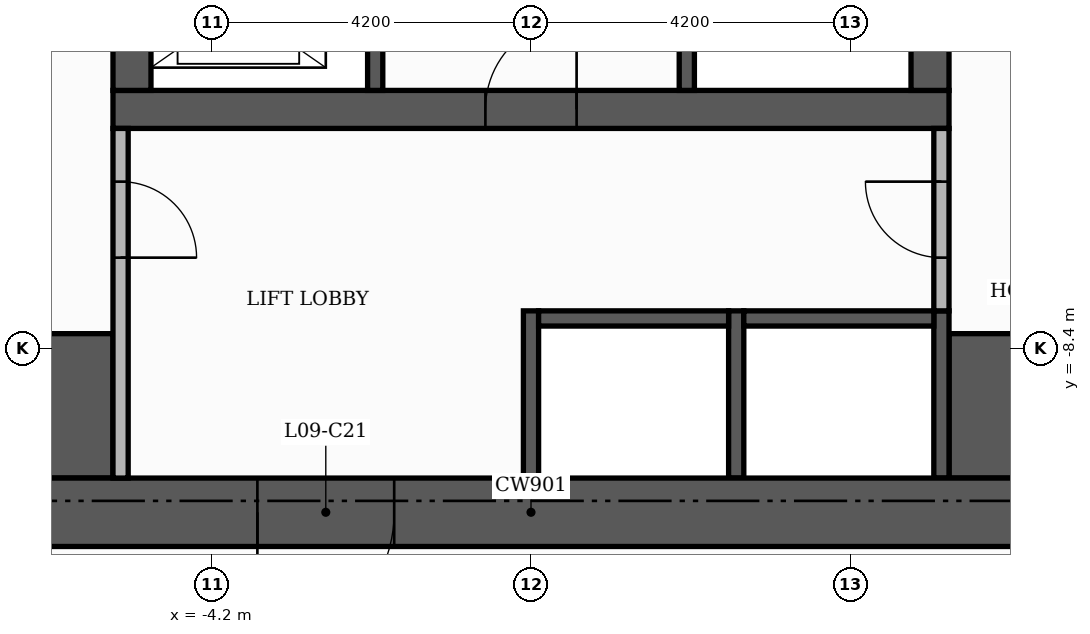
"""IFC4 building model, lengths in metres.
Left out: names, types, materials, properties, quantities, classifications, styles, units other than length and angle.
Written with IfcOpenShell. Run it as: python <this file> out.ifc"""

import sys

from ifc_helpers import new_model, si_unit, direction, frame, frame_2d, origin, place, context, subcontext, project, spatial, rectangle, extrude, element, fill, save


model = new_model("IFC4")
c1 = context("Model", 3, precision=1e-05, world=origin(), true_north=direction((0.0, 1.0)))
c2 = subcontext(c1, "Body", "Model", "MODEL_VIEW")
j1 = project(units=[si_unit("LENGTHUNIT", "METRE"), si_unit("PLANEANGLEUNIT", "RADIAN")], contexts=[c1])
p1 = place(None, origin())
s1 = spatial("IfcSite", under=j1, at=p1, CompositionType="ELEMENT")
p2 = place(p1, origin())
s2 = spatial("IfcBuilding", under=s1, at=p2, CompositionType="ELEMENT")
p3 = place(p2, frame((0.0, 0.0, 42.6)))
s3 = spatial("IfcBuildingStorey", under=s2, at=p3, CompositionType="ELEMENT", Elevation=42.6)
p4 = place(p3, frame((-5.5, -5.25, 0.0), z_axis=(0.0, 0.0, 1.0), x_axis=(1.0, 0.0, 0.0)))
e1 = element("IfcWall", 1, at=p4, inside=s3, PredefinedType="SHEAR", context=c2, shape_type="SweptSolid", body=[
    extrude(rectangle(XDim=11.0, YDim=0.5, at=frame_2d((5.5, 0.0))), origin(), (0.0, 0.0, 1.0), 3.48),
])
p5 = place(p4, frame((4.9, 0.0, 0.0)))
e2 = element("IfcOpeningElement", 2, at=p5, cuts=e1, PredefinedType="OPENING", context=c2, shape_type="SweptSolid", body=[
    extrude(rectangle(XDim=1.2, YDim=2.1, at=frame_2d((0.6, 1.05))), frame((0.0, 0.26, 0.0), z_axis=(0.0, -1.0, 0.0), x_axis=(1.0, 0.0, 0.0)), (0.0, 0.0, 1.0), 0.52),
])
for number, where, z_axis, x_axis in (
    (3, (-5.25, -5.0, 0.0), (0.0, 0.0, 1.0), (0.0, 1.0, 0.0)),
    (4, (5.25, -5.0, 0.0), (0.0, 0.0, 1.0), (0.0, 1.0, 0.0)),
):
    element("IfcWall", number, at=place(p3, frame(where, z_axis=z_axis, x_axis=x_axis)), inside=s3, PredefinedType="SHEAR", context=c2, shape_type="SweptSolid", body=[
        extrude(rectangle(XDim=10.5, YDim=0.5, at=frame_2d((5.25, 0.0))), origin(), (0.0, 0.0, 1.0), 3.48),
    ])
for number, where, z_axis, x_axis in (
    (5, (-10.1, -9.15, 0.0), (0.0, 0.0, 1.0), (1.0, 0.0, 0.0)),
    (6, (5.5, -9.15, 0.0), (0.0, 0.0, 1.0), (1.0, 0.0, 0.0)),
):
    element("IfcWall", number, at=place(p3, frame(where, z_axis=z_axis, x_axis=x_axis)), inside=s3, PredefinedType="SHEAR", context=c2, shape_type="SweptSolid", body=[
        extrude(rectangle(XDim=4.6, YDim=1.9, at=frame_2d((2.3, 0.0))), origin(), (0.0, 0.0, 1.0), 3.48),
    ])
p6 = place(p3, frame((2.05, -5.0, 0.0), z_axis=(0.0, 0.0, 1.0), x_axis=(0.0, 1.0, 0.0)))
e7 = element("IfcWall", 7, at=p6, inside=s3, PredefinedType="SHEAR", context=c2, shape_type="SweptSolid", body=[
    extrude(rectangle(XDim=6.6, YDim=0.2, at=frame_2d((3.3, 0.0))), origin(), (0.0, 0.0, 1.0), 3.48),
])
p7 = place(p6, frame((5.25, 0.0, 0.0)))
e8 = element("IfcOpeningElement", 8, at=p7, cuts=e7, PredefinedType="OPENING", context=c2, shape_type="SweptSolid", body=[
    extrude(rectangle(XDim=1.0, YDim=2.1, at=frame_2d((0.5, 1.05))), frame((0.0, 0.11, 0.0), z_axis=(0.0, -1.0, 0.0), x_axis=(1.0, 0.0, 0.0)), (0.0, 0.0, 1.0), 0.22),
])
for number, where, z_axis, x_axis in (
    (9, (0.0, -10.1, 0.0), (0.0, 0.0, 1.0), (0.0, 1.0, 0.0)),
    (10, (2.7, -10.1, 0.0), (0.0, 0.0, 1.0), (0.0, 1.0, 0.0)),
    (11, (5.4, -10.1, 0.0), (0.0, 0.0, 1.0), (0.0, 1.0, 0.0)),
):
    element("IfcWall", number, at=place(p3, frame(where, z_axis=z_axis, x_axis=x_axis)), inside=s3, PredefinedType="SHEAR", context=c2, shape_type="SweptSolid", body=[
        extrude(rectangle(XDim=2.2, YDim=0.2, at=frame_2d((1.1, 0.0))), origin(), (0.0, 0.0, 1.0), 3.48),
    ])
for number, where, z_axis, x_axis in (
    (12, (0.1, -8.0, 0.0), (0.0, 0.0, 1.0), (1.0, 0.0, 0.0)),
    (13, (2.8, -8.0, 0.0), (0.0, 0.0, 1.0), (1.0, 0.0, 0.0)),
):
    element("IfcWall", number, at=place(p3, frame(where, z_axis=z_axis, x_axis=x_axis)), inside=s3, PredefinedType="SHEAR", context=c2, shape_type="SweptSolid", body=[
        extrude(rectangle(XDim=2.5, YDim=0.2, at=frame_2d((1.25, 0.0))), origin(), (0.0, 0.0, 1.0), 3.48),
    ])
p8 = place(p3, frame((-2.05, -5.0, 0.0), z_axis=(0.0, 0.0, 1.0), x_axis=(0.0, 1.0, 0.0)))
e14 = element("IfcWall", 14, at=p8, inside=s3, PredefinedType="SHEAR", context=c2, shape_type="SweptSolid", body=[
    extrude(rectangle(XDim=3.4, YDim=0.2, at=frame_2d((1.7, 0.0))), origin(), (0.0, 0.0, 1.0), 3.48),
])
p9 = place(p8, frame((0.55, 0.0, 0.0)))
e15 = element("IfcOpeningElement", 15, at=p9, cuts=e14, PredefinedType="OPENING", context=c2, shape_type="SweptSolid", body=[
    extrude(rectangle(XDim=1.1, YDim=2.1, at=frame_2d((0.55, 1.05))), frame((0.0, 0.11, 0.0), z_axis=(0.0, -1.0, 0.0), x_axis=(1.0, 0.0, 0.0)), (0.0, 0.0, 1.0), 0.22),
])
p10 = place(p8, frame((2.45, 0.0, 0.0)))
e16 = element("IfcOpeningElement", 16, at=p10, cuts=e14, PredefinedType="OPENING", context=c2, shape_type="SweptSolid", body=[
    extrude(rectangle(XDim=0.8, YDim=2.1, at=frame_2d((0.4, 1.05))), frame((0.0, 0.11, 0.0), z_axis=(0.0, -1.0, 0.0), x_axis=(1.0, 0.0, 0.0)), (0.0, 0.0, 1.0), 0.22),
])
p11 = place(p3, frame((-11.0, -10.55, 0.0), z_axis=(0.0, 0.0, 1.0), x_axis=(1.0, 0.0, 0.0)))
e17 = element("IfcWall", 17, at=p11, inside=s3, PredefinedType="SHEAR", context=c2, shape_type="SweptSolid", body=[
    extrude(rectangle(XDim=22.0, YDim=0.9, at=frame_2d((11.0, 0.0))), origin(), (0.0, 0.0, 1.0), 3.48),
])
p12 = place(p11, frame((7.4, 0.0, 0.0)))
e18 = element("IfcOpeningElement", 18, at=p12, cuts=e17, PredefinedType="OPENING", context=c2, shape_type="SweptSolid", body=[
    extrude(rectangle(XDim=1.8, YDim=2.2, at=frame_2d((0.9, 1.1))), frame((0.0, 0.46, 0.0), z_axis=(0.0, -1.0, 0.0), x_axis=(1.0, 0.0, 0.0)), (0.0, 0.0, 1.0), 0.92),
])
p13 = place(p3, frame((-5.4, -10.1, 0.0), z_axis=(0.0, 0.0, 1.0), x_axis=(0.0, 1.0, 0.0)))
e19 = element("IfcWall", 19, at=p13, inside=s3, PredefinedType="PARTITIONING", context=c2, shape_type="SweptSolid", body=[
    extrude(rectangle(XDim=4.6, YDim=0.2, at=frame_2d((2.3, 0.0))), origin(), (0.0, 0.0, 1.0), 3.48),
])
p14 = place(p13, frame((2.9, 0.0, 0.0)))
e20 = element("IfcOpeningElement", 20, at=p14, cuts=e19, PredefinedType="OPENING", context=c2, shape_type="SweptSolid", body=[
    extrude(rectangle(XDim=1.0, YDim=2.1, at=frame_2d((0.5, 1.05))), frame((0.0, 0.11, 0.0), z_axis=(0.0, -1.0, 0.0), x_axis=(1.0, 0.0, 0.0)), (0.0, 0.0, 1.0), 0.22),
])
p15 = place(p3, frame((5.4, -7.9, 0.0), z_axis=(0.0, 0.0, 1.0), x_axis=(0.0, 1.0, 0.0)))
e21 = element("IfcWall", 21, at=p15, inside=s3, PredefinedType="PARTITIONING", context=c2, shape_type="SweptSolid", body=[
    extrude(rectangle(XDim=2.4, YDim=0.2, at=frame_2d((1.2, 0.0))), origin(), (0.0, 0.0, 1.0), 3.48),
])
p16 = place(p15, frame((0.7, 0.0, 0.0)))
e22 = element("IfcOpeningElement", 22, at=p16, cuts=e21, PredefinedType="OPENING", context=c2, shape_type="SweptSolid", body=[
    extrude(rectangle(XDim=1.0, YDim=2.1, at=frame_2d((0.5, 1.05))), frame((0.0, 0.11, 0.0), z_axis=(0.0, -1.0, 0.0), x_axis=(1.0, 0.0, 0.0)), (0.0, 0.0, 1.0), 0.22),
])
p17 = place(p5, origin())
e23 = element("IfcDoor", 23, at=p17, inside=s3, OperationType="SINGLE_SWING_RIGHT", PredefinedType="DOOR", context=c2, shape_type="SweptSolid", body=[
    extrude(rectangle(XDim=1.2, YDim=2.1, at=frame_2d((0.6, 1.05))), frame((0.0, 0.025, 0.0), z_axis=(0.0, -1.0, 0.0), x_axis=(1.0, 0.0, 0.0)), (0.0, 0.0, 1.0), 0.05),
])
fill(e2, e23)
p18 = place(p14, frame((1.0, 0.0, 0.0), z_axis=(0.0, 0.0, 1.0), x_axis=(-1.0, 0.0, 0.0)))
e24 = element("IfcDoor", 24, at=p18, inside=s3, OperationType="SINGLE_SWING_LEFT", PredefinedType="DOOR", context=c2, shape_type="SweptSolid", body=[
    extrude(rectangle(XDim=1.0, YDim=2.1, at=frame_2d((0.5, 1.05))), frame((0.0, 0.025, 0.0), z_axis=(0.0, -1.0, 0.0), x_axis=(1.0, 0.0, 0.0)), (0.0, 0.0, 1.0), 0.05),
])
fill(e20, e24)
p19 = place(p16, origin())
e25 = element("IfcDoor", 25, at=p19, inside=s3, OperationType="SINGLE_SWING_RIGHT", PredefinedType="DOOR", context=c2, shape_type="SweptSolid", body=[
    extrude(rectangle(XDim=1.0, YDim=2.1, at=frame_2d((0.5, 1.05))), frame((0.0, 0.025, 0.0), z_axis=(0.0, -1.0, 0.0), x_axis=(1.0, 0.0, 0.0)), (0.0, 0.0, 1.0), 0.05),
])
fill(e22, e25)
p20 = place(p12, frame((1.8, 0.0, 0.0), z_axis=(0.0, 0.0, 1.0), x_axis=(-1.0, 0.0, 0.0)))
e26 = element("IfcDoor", 26, at=p20, inside=s3, OperationType="DOUBLE_DOOR_SINGLE_SWING", PredefinedType="DOOR", context=c2, shape_type="SweptSolid", body=[
    extrude(rectangle(XDim=1.8, YDim=2.2, at=frame_2d((0.9, 1.1))), frame((0.0, 0.025, 0.0), z_axis=(0.0, -1.0, 0.0), x_axis=(1.0, 0.0, 0.0)), (0.0, 0.0, 1.0), 0.05),
])
fill(e18, e26)
save(model, sys.argv[1])
